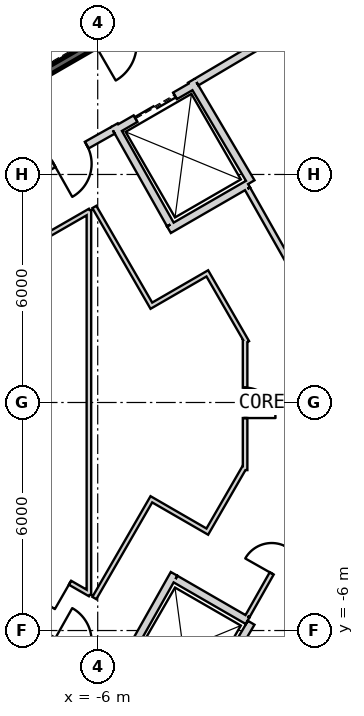
"""IFC4 building model, lengths in metres.
Left out: names, types, materials, properties, quantities, classifications, styles, units other than length and angle.
Written with IfcOpenShell. Run it as: python <this file> out.ifc"""

import sys

from ifc_helpers import new_model, si_unit, direction, frame, frame_2d, origin, place, context, subcontext, project, spatial, rectangle, extrude, element, fill, save


model = new_model("IFC4")
c1 = context("Model", 3, precision=1e-05, world=origin(), true_north=direction((0.0, 1.0)))
c2 = subcontext(c1, "Body", "Model", "MODEL_VIEW")
j1 = project(units=[si_unit("LENGTHUNIT", "METRE"), si_unit("PLANEANGLEUNIT", "RADIAN")], contexts=[c1])
p1 = place(None, origin())
s1 = spatial("IfcSite", under=j1, at=p1, CompositionType="ELEMENT")
p2 = place(p1, origin())
s2 = spatial("IfcBuilding", under=s1, at=p2, CompositionType="ELEMENT")
p3 = place(p2, frame((0.0, 0.0, 82.4)))
s3 = spatial("IfcBuildingStorey", under=s2, at=p3, CompositionType="ELEMENT", Elevation=82.4)
p4 = place(p3, frame((19.475, 2.208, 0.0), z_axis=(0.0, 0.0, 1.0), x_axis=(-0.866028369851, 0.499994862586, 0.0)))
e1 = element("IfcWall", 1, at=p4, inside=s3, PredefinedType="SHEAR", context=c2, shape_type="SweptSolid", body=[
    extrude(rectangle(XDim=31.523, YDim=0.9, at=frame_2d((15.762, 0.0))), origin(), (0.0, 0.0, 1.0), 4.1),
])
p5 = place(p4, frame((7.062, 0.0, 0.0)))
e2 = element("IfcOpeningElement", 2, at=p5, cuts=e1, PredefinedType="OPENING", context=c2, shape_type="SweptSolid", body=[
    extrude(rectangle(XDim=1.2, YDim=2.4, at=frame_2d((0.6, 1.2))), frame((0.0, 0.46, 0.0), z_axis=(0.0, -1.0, 0.0), x_axis=(1.0, 0.0, 0.0)), (0.0, 0.0, 1.0), 0.92),
])
p6 = place(p4, frame((9.762, 0.0, 0.0)))
e3 = element("IfcOpeningElement", 3, at=p6, cuts=e1, PredefinedType="OPENING", context=c2, shape_type="SweptSolid", body=[
    extrude(rectangle(XDim=1.2, YDim=2.4, at=frame_2d((0.6, 1.2))), frame((0.0, 0.46, 0.0), z_axis=(0.0, -1.0, 0.0), x_axis=(1.0, 0.0, 0.0)), (0.0, 0.0, 1.0), 0.92),
])
p7 = place(p4, frame((12.462, 0.0, 0.0)))
e4 = element("IfcOpeningElement", 4, at=p7, cuts=e1, PredefinedType="OPENING", context=c2, shape_type="SweptSolid", body=[
    extrude(rectangle(XDim=1.2, YDim=2.4, at=frame_2d((0.6, 1.2))), frame((0.0, 0.46, 0.0), z_axis=(0.0, -1.0, 0.0), x_axis=(1.0, 0.0, 0.0)), (0.0, 0.0, 1.0), 0.92),
])
p8 = place(p4, frame((15.162, 0.0, 0.0)))
e5 = element("IfcOpeningElement", 5, at=p8, cuts=e1, PredefinedType="OPENING", context=c2, shape_type="SweptSolid", body=[
    extrude(rectangle(XDim=1.2, YDim=2.4, at=frame_2d((0.6, 1.2))), frame((0.0, 0.46, 0.0), z_axis=(0.0, -1.0, 0.0), x_axis=(1.0, 0.0, 0.0)), (0.0, 0.0, 1.0), 0.92),
])
p9 = place(p4, frame((17.862, 0.0, 0.0)))
e6 = element("IfcOpeningElement", 6, at=p9, cuts=e1, PredefinedType="OPENING", context=c2, shape_type="SweptSolid", body=[
    extrude(rectangle(XDim=1.2, YDim=2.4, at=frame_2d((0.6, 1.2))), frame((0.0, 0.46, 0.0), z_axis=(0.0, -1.0, 0.0), x_axis=(1.0, 0.0, 0.0)), (0.0, 0.0, 1.0), 0.92),
])
p10 = place(p4, frame((20.562, 0.0, 0.0)))
e7 = element("IfcOpeningElement", 7, at=p10, cuts=e1, PredefinedType="OPENING", context=c2, shape_type="SweptSolid", body=[
    extrude(rectangle(XDim=1.2, YDim=2.4, at=frame_2d((0.6, 1.2))), frame((0.0, 0.46, 0.0), z_axis=(0.0, -1.0, 0.0), x_axis=(1.0, 0.0, 0.0)), (0.0, 0.0, 1.0), 0.92),
])
p11 = place(p4, frame((23.262, 0.0, 0.0)))
e8 = element("IfcOpeningElement", 8, at=p11, cuts=e1, PredefinedType="OPENING", context=c2, shape_type="SweptSolid", body=[
    extrude(rectangle(XDim=1.2, YDim=2.4, at=frame_2d((0.6, 1.2))), frame((0.0, 0.46, 0.0), z_axis=(0.0, -1.0, 0.0), x_axis=(1.0, 0.0, 0.0)), (0.0, 0.0, 1.0), 0.92),
])
p12 = place(p4, frame((3.612, 0.0, 0.0)))
e9 = element("IfcOpeningElement", 9, at=p12, cuts=e1, PredefinedType="OPENING", context=c2, shape_type="SweptSolid", body=[
    extrude(rectangle(XDim=1.2, YDim=2.4, at=frame_2d((0.6, 1.2))), frame((0.0, 0.46, 0.0), z_axis=(0.0, -1.0, 0.0), x_axis=(1.0, 0.0, 0.0)), (0.0, 0.0, 1.0), 0.92),
])
p13 = place(p4, frame((26.712, 0.0, 0.0)))
e10 = element("IfcOpeningElement", 10, at=p13, cuts=e1, PredefinedType="OPENING", context=c2, shape_type="SweptSolid", body=[
    extrude(rectangle(XDim=1.2, YDim=2.4, at=frame_2d((0.6, 1.2))), frame((0.0, 0.46, 0.0), z_axis=(0.0, -1.0, 0.0), x_axis=(1.0, 0.0, 0.0)), (0.0, 0.0, 1.0), 0.92),
])
p14 = place(p3, frame((-7.825, -17.97, 0.0), z_axis=(0.0, 0.0, 1.0), x_axis=(0.866028369851, 0.499994862586, 0.0)))
e11 = element("IfcWall", 11, at=p14, inside=s3, PredefinedType="SHEAR", context=c2, shape_type="SweptSolid", body=[
    extrude(rectangle(XDim=31.523, YDim=0.9, at=frame_2d((15.762, 0.0))), origin(), (0.0, 0.0, 1.0), 4.1),
])
p15 = place(p14, frame((7.062, 0.0, 0.0)))
e12 = element("IfcOpeningElement", 12, at=p15, cuts=e11, PredefinedType="OPENING", context=c2, shape_type="SweptSolid", body=[
    extrude(rectangle(XDim=1.2, YDim=2.4, at=frame_2d((0.6, 1.2))), frame((0.0, 0.46, 0.0), z_axis=(0.0, -1.0, 0.0), x_axis=(1.0, 0.0, 0.0)), (0.0, 0.0, 1.0), 0.92),
])
p16 = place(p14, frame((9.762, 0.0, 0.0)))
e13 = element("IfcOpeningElement", 13, at=p16, cuts=e11, PredefinedType="OPENING", context=c2, shape_type="SweptSolid", body=[
    extrude(rectangle(XDim=1.2, YDim=2.4, at=frame_2d((0.6, 1.2))), frame((0.0, 0.46, 0.0), z_axis=(0.0, -1.0, 0.0), x_axis=(1.0, 0.0, 0.0)), (0.0, 0.0, 1.0), 0.92),
])
p17 = place(p14, frame((12.462, 0.0, 0.0)))
e14 = element("IfcOpeningElement", 14, at=p17, cuts=e11, PredefinedType="OPENING", context=c2, shape_type="SweptSolid", body=[
    extrude(rectangle(XDim=1.2, YDim=2.4, at=frame_2d((0.6, 1.2))), frame((0.0, 0.46, 0.0), z_axis=(0.0, -1.0, 0.0), x_axis=(1.0, 0.0, 0.0)), (0.0, 0.0, 1.0), 0.92),
])
p18 = place(p14, frame((15.162, 0.0, 0.0)))
e15 = element("IfcOpeningElement", 15, at=p18, cuts=e11, PredefinedType="OPENING", context=c2, shape_type="SweptSolid", body=[
    extrude(rectangle(XDim=1.2, YDim=2.4, at=frame_2d((0.6, 1.2))), frame((0.0, 0.46, 0.0), z_axis=(0.0, -1.0, 0.0), x_axis=(1.0, 0.0, 0.0)), (0.0, 0.0, 1.0), 0.92),
])
p19 = place(p14, frame((17.862, 0.0, 0.0)))
e16 = element("IfcOpeningElement", 16, at=p19, cuts=e11, PredefinedType="OPENING", context=c2, shape_type="SweptSolid", body=[
    extrude(rectangle(XDim=1.2, YDim=2.4, at=frame_2d((0.6, 1.2))), frame((0.0, 0.46, 0.0), z_axis=(0.0, -1.0, 0.0), x_axis=(1.0, 0.0, 0.0)), (0.0, 0.0, 1.0), 0.92),
])
p20 = place(p14, frame((20.562, 0.0, 0.0)))
e17 = element("IfcOpeningElement", 17, at=p20, cuts=e11, PredefinedType="OPENING", context=c2, shape_type="SweptSolid", body=[
    extrude(rectangle(XDim=1.2, YDim=2.4, at=frame_2d((0.6, 1.2))), frame((0.0, 0.46, 0.0), z_axis=(0.0, -1.0, 0.0), x_axis=(1.0, 0.0, 0.0)), (0.0, 0.0, 1.0), 0.92),
])
p21 = place(p14, frame((26.712, 0.0, 0.0)))
e18 = element("IfcOpeningElement", 18, at=p21, cuts=e11, PredefinedType="OPENING", context=c2, shape_type="SweptSolid", body=[
    extrude(rectangle(XDim=1.2, YDim=2.4, at=frame_2d((0.6, 1.2))), frame((0.0, 0.46, 0.0), z_axis=(0.0, -1.0, 0.0), x_axis=(1.0, 0.0, 0.0)), (0.0, 0.0, 1.0), 0.92),
])
p22 = place(p14, frame((3.612, 0.0, 0.0)))
e19 = element("IfcOpeningElement", 19, at=p22, cuts=e11, PredefinedType="OPENING", context=c2, shape_type="SweptSolid", body=[
    extrude(rectangle(XDim=1.2, YDim=2.4, at=frame_2d((0.6, 1.2))), frame((0.0, 0.46, 0.0), z_axis=(0.0, -1.0, 0.0), x_axis=(1.0, 0.0, 0.0)), (0.0, 0.0, 1.0), 0.92),
])
p23 = place(p3, frame((0.483, 8.936, 0.0), z_axis=(0.0, 0.0, 1.0), x_axis=(-0.874269620932, 0.485440655401, 0.0)))
e20 = element("IfcWall", 20, at=p23, inside=s3, PredefinedType="PLUMBINGWALL", context=c2, shape_type="SweptSolid", body=[
    extrude(rectangle(XDim=1.845, YDim=0.2, at=frame_2d((0.922, 0.0))), origin(), (0.0, 0.0, 1.0), 3.8),
])
p24 = place(p3, frame((-11.245, 15.678, -0.3), z_axis=(0.0, 0.0, 1.0), x_axis=(0.499977274689, -0.866038523851, 0.0)))
e21 = element("IfcWall", 21, at=p24, inside=s3, PredefinedType="SHEAR", context=c2, shape_type="SweptSolid", body=[
    extrude(rectangle(XDim=8.1, YDim=0.2, at=frame_2d((4.05, 0.0))), origin(), (0.0, 0.0, 1.0), 4.1),
])
p25 = place(p3, frame((-7.159, 8.8, -0.3), z_axis=(0.0, 0.0, 1.0), x_axis=(0.866047807691, 0.499961193289, 0.0)))
e22 = element("IfcWall", 22, at=p25, inside=s3, PredefinedType="SHEAR", context=c2, shape_type="SweptSolid", body=[
    extrude(rectangle(XDim=3.6, YDim=0.2, at=frame_2d((1.8, 0.0))), origin(), (0.0, 0.0, 1.0), 4.1),
])
p26 = place(p25, frame((1.25, 0.0, 0.3)))
e23 = element("IfcOpeningElement", 23, at=p26, cuts=e22, PredefinedType="OPENING", context=c2, shape_type="SweptSolid", body=[
    extrude(rectangle(XDim=1.1, YDim=2.1, at=frame_2d((0.55, 1.05))), frame((0.0, 0.11, 0.0), z_axis=(0.0, -1.0, 0.0), x_axis=(1.0, 0.0, 0.0)), (0.0, 0.0, 1.0), 0.22),
])
p27 = place(p3, frame((-5.524, 7.168, 0.0), z_axis=(0.0, 0.0, 1.0), x_axis=(0.866024647952, 0.500001309137, 0.0)))
e24 = element("IfcWall", 24, at=p27, inside=s3, PredefinedType="PLUMBINGWALL", context=c2, shape_type="SweptSolid", body=[
    extrude(rectangle(XDim=2.4, YDim=0.2, at=frame_2d((1.2, 0.0))), origin(), (0.0, 0.0, 1.0), 3.8),
])
p28 = place(p27, frame((0.6, 0.0, 0.0)))
e25 = element("IfcOpeningElement", 25, at=p28, cuts=e24, PredefinedType="OPENING", context=c2, shape_type="SweptSolid", body=[
    extrude(rectangle(XDim=1.2, YDim=2.4, at=frame_2d((0.6, 1.2))), frame((0.0, 0.11, 0.0), z_axis=(0.0, -1.0, 0.0), x_axis=(1.0, 0.0, 0.0)), (0.0, 0.0, 1.0), 0.22),
])
p29 = place(p3, frame((-3.538, 8.465, 0.0), z_axis=(0.0, 0.0, 1.0), x_axis=(0.508647062354, -0.860975125052, 0.0)))
e26 = element("IfcWall", 26, at=p29, inside=s3, PredefinedType="PLUMBINGWALL", context=c2, shape_type="SweptSolid", body=[
    extrude(rectangle(XDim=3.1, YDim=0.2, at=frame_2d((1.55, 0.0))), origin(), (0.0, 0.0, 1.0), 3.8),
])
p30 = place(p3, frame((-2.043, 5.748, 0.0), z_axis=(0.0, 0.0, 1.0), x_axis=(-0.866035096217, -0.499983211839, 0.0)))
e27 = element("IfcWall", 27, at=p30, inside=s3, PredefinedType="PLUMBINGWALL", context=c2, shape_type="SweptSolid", body=[
    extrude(rectangle(XDim=2.404, YDim=0.2, at=frame_2d((1.202, 0.0))), origin(), (0.0, 0.0, 1.0), 3.8),
])
p31 = place(p3, frame((-5.562, 7.296, 0.0), z_axis=(0.0, 0.0, 1.0), x_axis=(0.49134651263, -0.870964180966, 0.0)))
e28 = element("IfcWall", 28, at=p31, inside=s3, PredefinedType="PLUMBINGWALL", context=c2, shape_type="SweptSolid", body=[
    extrude(rectangle(XDim=3.0, YDim=0.2, at=frame_2d((1.5, 0.0))), origin(), (0.0, 0.0, 1.0), 3.8),
])
p32 = place(p3, frame((-1.961, -5.796, 0.0), z_axis=(0.0, 0.0, 1.0), x_axis=(-0.508647062354, -0.860975125052, 0.0)))
e29 = element("IfcWall", 29, at=p32, inside=s3, PredefinedType="PLUMBINGWALL", context=c2, shape_type="SweptSolid", body=[
    extrude(rectangle(XDim=3.1, YDim=0.2, at=frame_2d((1.55, 0.0))), origin(), (0.0, 0.0, 1.0), 3.8),
])
p33 = place(p3, frame((-3.99, -4.509, 0.0), z_axis=(0.0, 0.0, 1.0), x_axis=(-0.491358283181, -0.870957540612, 0.0)))
e30 = element("IfcWall", 30, at=p33, inside=s3, PredefinedType="PLUMBINGWALL", context=c2, shape_type="SweptSolid", body=[
    extrude(rectangle(XDim=3.2, YDim=0.2, at=frame_2d((1.6, 0.0))), origin(), (0.0, 0.0, 1.0), 3.8),
])
p34 = place(p3, frame((-3.953, -4.646, 0.0), z_axis=(0.0, 0.0, 1.0), x_axis=(0.866038900241, -0.499976622722, 0.0)))
e31 = element("IfcWall", 31, at=p34, inside=s3, PredefinedType="PLUMBINGWALL", context=c2, shape_type="SweptSolid", body=[
    extrude(rectangle(XDim=2.189, YDim=0.2, at=frame_2d((1.095, 0.0))), origin(), (0.0, 0.0, 1.0), 3.8),
])
p35 = place(p3, frame((-1.18, 9.744, 0.0), z_axis=(0.0, 0.0, 1.0), x_axis=(-0.860615607571, -0.509255118781, 0.0)))
e32 = element("IfcWall", 32, at=p35, inside=s3, PredefinedType="PARTITIONING", context=c2, shape_type="SweptSolid", body=[
    extrude(rectangle(XDim=2.581, YDim=0.2, at=frame_2d((1.29, 0.0))), origin(), (0.0, 0.0, 1.0), 3.8),
])
p36 = place(p3, frame((-5.6, 7.16, 0.0), z_axis=(0.0, 0.0, 1.0), x_axis=(-0.871363259478, -0.490638431059, 0.0)))
e33 = element("IfcWall", 33, at=p36, inside=s3, PredefinedType="PARTITIONING", context=c2, shape_type="SweptSolid", body=[
    extrude(rectangle(XDim=2.581, YDim=0.2, at=frame_2d((1.291, 0.0))), origin(), (0.0, 0.0, 1.0), 3.8),
])
p37 = place(p36, frame((0.791, 0.0, 0.0)))
e34 = element("IfcOpeningElement", 34, at=p37, cuts=e33, PredefinedType="OPENING", context=c2, shape_type="SweptSolid", body=[
    extrude(rectangle(XDim=1.0, YDim=2.1, at=frame_2d((0.5, 1.05))), frame((0.0, 0.11, 0.0), z_axis=(0.0, -1.0, 0.0), x_axis=(1.0, 0.0, 0.0)), (0.0, 0.0, 1.0), 0.22),
])
p38 = place(p3, frame((-7.849, -5.894, 0.0), z_axis=(0.0, 0.0, 1.0), x_axis=(0.871363259478, -0.490638431059, 0.0)))
e35 = element("IfcWall", 35, at=p38, inside=s3, PredefinedType="PARTITIONING", context=c2, shape_type="SweptSolid", body=[
    extrude(rectangle(XDim=2.581, YDim=0.2, at=frame_2d((1.291, 0.0))), origin(), (0.0, 0.0, 1.0), 3.8),
])
p39 = place(p38, frame((0.791, 0.0, 0.0)))
e36 = element("IfcOpeningElement", 36, at=p39, cuts=e35, PredefinedType="OPENING", context=c2, shape_type="SweptSolid", body=[
    extrude(rectangle(XDim=1.0, YDim=2.1, at=frame_2d((0.5, 1.05))), frame((0.0, 0.11, 0.0), z_axis=(0.0, -1.0, 0.0), x_axis=(1.0, 0.0, 0.0)), (0.0, 0.0, 1.0), 0.22),
])
p40 = place(p3, frame((-2.059, 5.624, 0.0), z_axis=(0.0, 0.0, 1.0), x_axis=(0.49265005812, -0.870227510617, 0.0)))
e37 = element("IfcWall", 37, at=p40, inside=s3, PredefinedType="PLUMBINGWALL", context=c2, shape_type="SweptSolid", body=[
    extrude(rectangle(XDim=3.365, YDim=0.15, at=frame_2d((1.683, 0.0))), origin(), (0.0, 0.0, 1.0), 3.8),
])
p41 = place(p3, frame((-0.34, -2.586, 0.0), z_axis=(0.0, 0.0, 1.0), x_axis=(-0.492647196214, -0.870229130782, 0.0)))
e38 = element("IfcWall", 38, at=p41, inside=s3, PredefinedType="PARTITIONING", context=c2, shape_type="SweptSolid", body=[
    extrude(rectangle(XDim=3.49, YDim=0.12, at=frame_2d((1.745, 0.0))), origin(), (0.0, 0.0, 1.0), 3.8),
])
p42 = place(p41, frame((1.396, 0.0, 0.0)))
e39 = element("IfcOpeningElement", 39, at=p42, cuts=e38, PredefinedType="OPENING", context=c2, shape_type="SweptSolid", body=[
    extrude(rectangle(XDim=0.8, YDim=2.1, at=frame_2d((0.4, 1.05))), frame((0.0, 0.07, 0.0), z_axis=(0.0, -1.0, 0.0), x_axis=(1.0, 0.0, 0.0)), (0.0, 0.0, 1.0), 0.14),
])
p43 = place(p3, frame((-6.231, 5.062, 0.0), z_axis=(0.0, 0.0, 1.0), x_axis=(0.0, -1.0, 0.0)))
e40 = element("IfcWall", 40, at=p43, inside=s3, PredefinedType="PARTITIONING", context=c2, shape_type="SweptSolid", body=[
    extrude(rectangle(XDim=10.125, YDim=0.12, at=frame_2d((5.062, 0.0))), origin(), (0.0, 0.0, 1.0), 3.8),
])
p44 = place(p3, frame((-7.95, -4.041, 0.0), z_axis=(0.0, 0.0, 1.0), x_axis=(0.867071050325, -0.498184497639, 0.0)))
e41 = element("IfcWall", 41, at=p44, inside=s3, PredefinedType="PARTITIONING", context=c2, shape_type="SweptSolid", body=[
    extrude(rectangle(XDim=2.017, YDim=0.12, at=frame_2d((1.008, 0.0))), origin(), (0.0, 0.0, 1.0), 3.8),
])
p45 = place(p44, frame((0.608, 0.0, 0.0)))
e42 = element("IfcOpeningElement", 42, at=p45, cuts=e41, PredefinedType="OPENING", context=c2, shape_type="SweptSolid", body=[
    extrude(rectangle(XDim=0.8, YDim=2.1, at=frame_2d((0.4, 1.05))), frame((0.0, 0.07, 0.0), z_axis=(0.0, -1.0, 0.0), x_axis=(1.0, 0.0, 0.0)), (0.0, 0.0, 1.0), 0.14),
])
p46 = place(p3, frame((-6.201, 5.046, 0.0), z_axis=(0.0, 0.0, 1.0), x_axis=(-0.867071050325, -0.498184497639, 0.0)))
e43 = element("IfcWall", 43, at=p46, inside=s3, PredefinedType="PARTITIONING", context=c2, shape_type="SweptSolid", body=[
    extrude(rectangle(XDim=2.017, YDim=0.12, at=frame_2d((1.008, 0.0))), origin(), (0.0, 0.0, 1.0), 3.8),
])
p47 = place(p3, frame((-4.558, 2.495, 0.0), z_axis=(0.0, 0.0, 1.0), x_axis=(-0.499991792115, 0.866030142557, 0.0)))
e44 = element("IfcWall", 44, at=p47, inside=s3, PredefinedType="PARTITIONING", context=c2, shape_type="SweptSolid", body=[
    extrude(rectangle(XDim=3.06, YDim=0.12, at=frame_2d((1.53, 0.0))), origin(), (0.0, 0.0, 1.0), 3.8),
])
p48 = place(p3, frame((-3.064, 3.427, 0.0), z_axis=(0.0, 0.0, 1.0), x_axis=(-0.866087547558, -0.499892348375, 0.0)))
e45 = element("IfcWall", 45, at=p48, inside=s3, PredefinedType="PARTITIONING", context=c2, shape_type="SweptSolid", body=[
    extrude(rectangle(XDim=1.7, YDim=0.12, at=frame_2d((0.85, 0.0))), origin(), (0.0, 0.0, 1.0), 3.8),
])
p49 = place(p3, frame((-2.07, 1.585, 0.0), z_axis=(0.0, 0.0, 1.0), x_axis=(-0.499937346687, 0.86606157367, 0.0)))
e46 = element("IfcWall", 46, at=p49, inside=s3, PredefinedType="PARTITIONING", context=c2, shape_type="SweptSolid", body=[
    extrude(rectangle(XDim=2.032, YDim=0.12, at=frame_2d((1.016, 0.0))), origin(), (0.0, 0.0, 1.0), 3.8),
])
p50 = place(p3, frame((-2.122, -1.779, 0.0), z_axis=(0.0, 0.0, 1.0), x_axis=(0.0, 1.0, 0.0)))
e47 = element("IfcWall", 47, at=p50, inside=s3, PredefinedType="PARTITIONING", context=c2, shape_type="SweptSolid", body=[
    extrude(rectangle(XDim=3.435, YDim=0.12, at=frame_2d((1.718, 0.0))), origin(), (0.0, 0.0, 1.0), 3.8),
])
p51 = place(p50, frame((1.37, 0.0, 0.0)))
e48 = element("IfcOpeningElement", 48, at=p51, cuts=e47, PredefinedType="OPENING", context=c2, shape_type="SweptSolid", body=[
    extrude(rectangle(XDim=0.8, YDim=2.1, at=frame_2d((0.4, 1.05))), frame((0.0, 0.07, 0.0), z_axis=(0.0, -1.0, 0.0), x_axis=(1.0, 0.0, 0.0)), (0.0, 0.0, 1.0), 0.14),
])
p52 = place(p3, frame((-3.146, -3.449, 0.0), z_axis=(0.0, 0.0, 1.0), x_axis=(0.500007041985, 0.866021338054, 0.0)))
e49 = element("IfcWall", 49, at=p52, inside=s3, PredefinedType="PARTITIONING", context=c2, shape_type="SweptSolid", body=[
    extrude(rectangle(XDim=2.03, YDim=0.12, at=frame_2d((1.015, 0.0))), origin(), (0.0, 0.0, 1.0), 3.8),
])
p53 = place(p3, frame((-4.64, -2.517, 0.0), z_axis=(0.0, 0.0, 1.0), x_axis=(0.865989465428, -0.500062241894, 0.0)))
e50 = element("IfcWall", 50, at=p53, inside=s3, PredefinedType="PARTITIONING", context=c2, shape_type="SweptSolid", body=[
    extrude(rectangle(XDim=1.7, YDim=0.12, at=frame_2d((0.85, 0.0))), origin(), (0.0, 0.0, 1.0), 3.8),
])
p54 = place(p3, frame((-6.088, -5.145, 0.0), z_axis=(0.0, 0.0, 1.0), x_axis=(0.500050696077, 0.865996132412, 0.0)))
e51 = element("IfcWall", 51, at=p54, inside=s3, PredefinedType="PARTITIONING", context=c2, shape_type="SweptSolid", body=[
    extrude(rectangle(XDim=2.94, YDim=0.12, at=frame_2d((1.47, 0.0))), origin(), (0.0, 0.0, 1.0), 3.8),
])
p55 = place(p3, frame((21.944, 4.998, 0.0), z_axis=(0.0, 0.0, 1.0), x_axis=(-0.866025615729, 0.499999632902, 0.0)))
e52 = element("IfcWall", 52, at=p55, inside=s3, PredefinedType="PARTITIONING", context=c2, shape_type="SweptSolid", body=[
    extrude(rectangle(XDim=32.811, YDim=0.2, at=frame_2d((16.405, 0.0))), origin(), (0.0, 0.0, 1.0), 2.98),
])
p56 = place(p55, frame((15.955, 0.0, 0.0)))
e53 = element("IfcOpeningElement", 53, at=p56, cuts=e52, PredefinedType="OPENING", context=c2, shape_type="SweptSolid", body=[
    extrude(rectangle(XDim=1.0, YDim=2.1, at=frame_2d((0.5, 1.05))), frame((0.0, 0.11, 0.0), z_axis=(0.0, -1.0, 0.0), x_axis=(1.0, 0.0, 0.0)), (0.0, 0.0, 1.0), 0.22),
])
p57 = place(p37, origin())
e54 = element("IfcDoor", 54, at=p57, inside=s3, OperationType="SINGLE_SWING_LEFT", PredefinedType="USERDEFINED", context=c2, shape_type="SweptSolid", body=[
    extrude(rectangle(XDim=1.0, YDim=2.1, at=frame_2d((0.5, 1.05))), frame((0.0, 0.025, 0.0), z_axis=(0.0, -1.0, 0.0), x_axis=(1.0, 0.0, 0.0)), (0.0, 0.0, 1.0), 0.05),
])
fill(e34, e54)
p58 = place(p28, origin())
e55 = element("IfcDoor", 55, at=p58, inside=s3, OperationType="SLIDING_TO_LEFT", PredefinedType="USERDEFINED", context=c2, shape_type="SweptSolid", body=[
    extrude(rectangle(XDim=1.2, YDim=2.4, at=frame_2d((0.6, 1.2))), frame((0.0, 0.025, 0.0), z_axis=(0.0, -1.0, 0.0), x_axis=(1.0, 0.0, 0.0)), (0.0, 0.0, 1.0), 0.05),
])
fill(e25, e55)
p59 = place(p42, origin())
e56 = element("IfcDoor", 56, at=p59, inside=s3, OperationType="SINGLE_SWING_LEFT", PredefinedType="USERDEFINED", context=c2, shape_type="SweptSolid", body=[
    extrude(rectangle(XDim=0.8, YDim=2.1, at=frame_2d((0.4, 1.05))), frame((0.0, 0.025, 0.0), z_axis=(0.0, -1.0, 0.0), x_axis=(1.0, 0.0, 0.0)), (0.0, 0.0, 1.0), 0.05),
])
fill(e39, e56)
p60 = place(p45, origin())
e57 = element("IfcDoor", 57, at=p60, inside=s3, OperationType="SINGLE_SWING_RIGHT", PredefinedType="USERDEFINED", context=c2, shape_type="SweptSolid", body=[
    extrude(rectangle(XDim=0.8, YDim=2.1, at=frame_2d((0.4, 1.05))), frame((0.0, 0.025, 0.0), z_axis=(0.0, -1.0, 0.0), x_axis=(1.0, 0.0, 0.0)), (0.0, 0.0, 1.0), 0.05),
])
fill(e42, e57)
p61 = place(p51, origin())
e58 = element("IfcDoor", 58, at=p61, inside=s3, OperationType="SINGLE_SWING_LEFT", PredefinedType="USERDEFINED", context=c2, shape_type="SweptSolid", body=[
    extrude(rectangle(XDim=0.8, YDim=2.1, at=frame_2d((0.4, 1.05))), frame((0.0, 0.025, 0.0), z_axis=(0.0, -1.0, 0.0), x_axis=(1.0, 0.0, 0.0)), (0.0, 0.0, 1.0), 0.05),
])
fill(e48, e58)
save(model, sys.argv[1])
